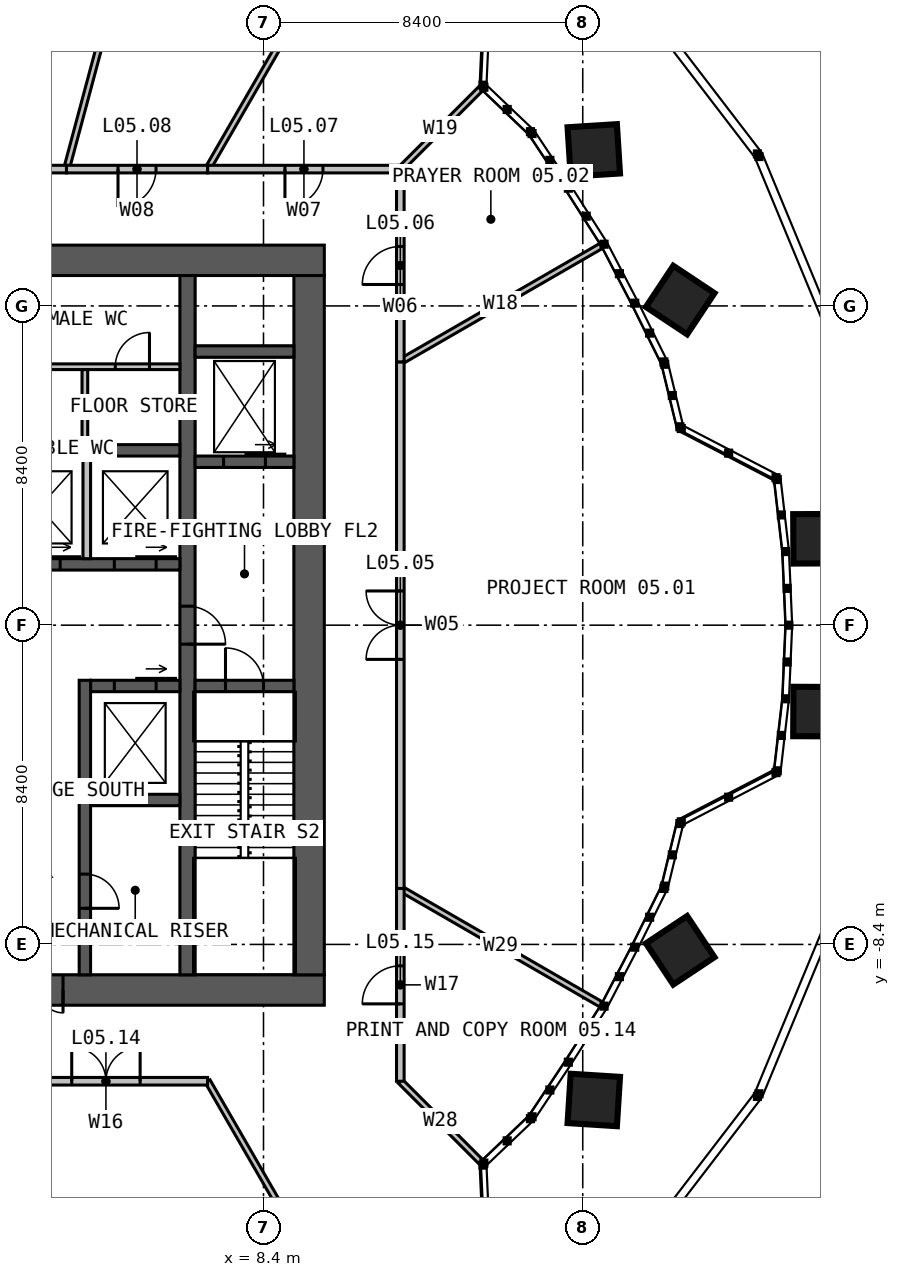
"""IFC4 building model, lengths in metres.
Left out: names, types, materials, properties, quantities, classifications, styles, units other than length and angle.
Written with IfcOpenShell. Run it as: python <this file> out.ifc"""

import sys

from ifc_helpers import new_model, si_unit, direction, frame, frame_2d, origin, place, context, subcontext, project, spatial, rectangle, extrude, element, fill, save


model = new_model("IFC4")
c1 = context("Model", 3, precision=1e-05, world=origin(), true_north=direction((0.0, 1.0)))
c2 = subcontext(c1, "Body", "Model", "MODEL_VIEW")
j1 = project(units=[si_unit("LENGTHUNIT", "METRE"), si_unit("PLANEANGLEUNIT", "RADIAN")], contexts=[c1])
p1 = place(None, origin())
s1 = spatial("IfcSite", under=j1, at=p1, CompositionType="ELEMENT")
p2 = place(p1, origin())
s2 = spatial("IfcBuilding", under=s1, at=p2, CompositionType="ELEMENT")
p3 = place(p2, frame((0.0, 0.0, 25.0)))
s3 = spatial("IfcBuildingStorey", under=s2, at=p3, CompositionType="ELEMENT", Elevation=25.0)
p4 = place(p3, frame((-10.0, 9.6, 0.0), z_axis=(0.0, 0.0, 1.0), x_axis=(1.0, 0.0, 0.0)))
e1 = element("IfcWall", 1, at=p4, inside=s3, PredefinedType="SOLIDWALL", context=c2, shape_type="SweptSolid", body=[
    extrude(rectangle(XDim=20.0, YDim=0.8, at=frame_2d((10.0, 0.0))), origin(), (0.0, 0.0, 1.0), 4.0),
])
p5 = place(p4, frame((9.4, 0.0, 0.0)))
e2 = element("IfcOpeningElement", 2, at=p5, cuts=e1, PredefinedType="OPENING", context=c2, shape_type="SweptSolid", body=[
    extrude(rectangle(XDim=1.2, YDim=2.2, at=frame_2d((0.6, 1.1))), frame((0.0, 0.41, 0.0), z_axis=(0.0, -1.0, 0.0), x_axis=(1.0, 0.0, 0.0)), (0.0, 0.0, 1.0), 0.82),
])
p6 = place(p3, frame((10.0, -9.6, 0.0), z_axis=(0.0, 0.0, 1.0), x_axis=(-1.0, 0.0, 0.0)))
e3 = element("IfcWall", 3, at=p6, inside=s3, PredefinedType="SOLIDWALL", context=c2, shape_type="SweptSolid", body=[
    extrude(rectangle(XDim=20.0, YDim=0.8, at=frame_2d((10.0, 0.0))), origin(), (0.0, 0.0, 1.0), 4.0),
])
p7 = place(p6, frame((6.875, 0.0, 0.0)))
e4 = element("IfcOpeningElement", 4, at=p7, cuts=e3, PredefinedType="OPENING", context=c2, shape_type="SweptSolid", body=[
    extrude(rectangle(XDim=1.2, YDim=2.2, at=frame_2d((0.6, 1.1))), frame((0.0, 0.41, 0.0), z_axis=(0.0, -1.0, 0.0), x_axis=(1.0, 0.0, 0.0)), (0.0, 0.0, 1.0), 0.82),
])
p8 = place(p3, frame((9.6, -9.2, 0.0), z_axis=(0.0, 0.0, 1.0), x_axis=(0.0, 1.0, 0.0)))
e5 = element("IfcWall", 5, at=p8, inside=s3, PredefinedType="SOLIDWALL", context=c2, shape_type="SweptSolid", body=[
    extrude(rectangle(XDim=18.4, YDim=0.8, at=frame_2d((9.2, 0.0))), origin(), (0.0, 0.0, 1.0), 4.0),
])
p9 = place(p3, frame((6.4, 9.2, 0.0), z_axis=(0.0, 0.0, 1.0), x_axis=(0.0, -1.0, 0.0)))
e6 = element("IfcWall", 6, at=p9, inside=s3, PredefinedType="SOLIDWALL", context=c2, shape_type="SweptSolid", body=[
    extrude(rectangle(XDim=18.4, YDim=0.4, at=frame_2d((9.2, 0.0))), origin(), (0.0, 0.0, 1.0), 4.0),
])
p10 = place(p9, frame((8.7, 0.0, 0.0)))
e7 = element("IfcOpeningElement", 7, at=p10, cuts=e6, PredefinedType="OPENING", context=c2, shape_type="SweptSolid", body=[
    extrude(rectangle(XDim=1.0, YDim=2.2, at=frame_2d((0.5, 1.1))), frame((0.0, 0.21, 0.0), z_axis=(0.0, -1.0, 0.0), x_axis=(1.0, 0.0, 0.0)), (0.0, 0.0, 1.0), 0.42),
])
p11 = place(p3, frame((1.35, 1.6, 0.0), z_axis=(0.0, 0.0, 1.0), x_axis=(1.0, 0.0, 0.0)))
e8 = element("IfcWall", 8, at=p11, inside=s3, PredefinedType="SOLIDWALL", context=c2, shape_type="SweptSolid", body=[
    extrude(rectangle(XDim=4.85, YDim=0.3, at=frame_2d((2.425, 0.0))), origin(), (0.0, 0.0, 1.0), 4.0),
])
p12 = place(p11, frame((0.6, 0.0, 0.0)))
e9 = element("IfcOpeningElement", 9, at=p12, cuts=e8, PredefinedType="OPENING", context=c2, shape_type="SweptSolid", body=[
    extrude(rectangle(XDim=1.1, YDim=2.2, at=frame_2d((0.55, 1.1))), frame((0.0, 0.16, 0.0), z_axis=(0.0, -1.0, 0.0), x_axis=(1.0, 0.0, 0.0)), (0.0, 0.0, 1.0), 0.32),
])
p13 = place(p11, frame((3.125, 0.0, 0.0)))
e10 = element("IfcOpeningElement", 10, at=p13, cuts=e8, PredefinedType="OPENING", context=c2, shape_type="SweptSolid", body=[
    extrude(rectangle(XDim=1.1, YDim=2.2, at=frame_2d((0.55, 1.1))), frame((0.0, 0.16, 0.0), z_axis=(0.0, -1.0, 0.0), x_axis=(1.0, 0.0, 0.0)), (0.0, 0.0, 1.0), 0.32),
])
p14 = place(p3, frame((1.35, 4.6, 0.0), z_axis=(0.0, 0.0, 1.0), x_axis=(1.0, 0.0, 0.0)))
e11 = element("IfcWall", 11, at=p14, inside=s3, PredefinedType="SOLIDWALL", context=c2, shape_type="SweptSolid", body=[
    extrude(rectangle(XDim=4.85, YDim=0.3, at=frame_2d((2.425, 0.0))), origin(), (0.0, 0.0, 1.0), 4.0),
])
p15 = place(p3, frame((3.85, -1.6, 0.0), z_axis=(0.0, 0.0, 1.0), x_axis=(1.0, 0.0, 0.0)))
e12 = element("IfcWall", 12, at=p15, inside=s3, PredefinedType="SOLIDWALL", context=c2, shape_type="SweptSolid", body=[
    extrude(rectangle(XDim=2.35, YDim=0.3, at=frame_2d((1.175, 0.0))), origin(), (0.0, 0.0, 1.0), 4.0),
])
p16 = place(p15, frame((0.625, 0.0, 0.0)))
e13 = element("IfcOpeningElement", 13, at=p16, cuts=e12, PredefinedType="OPENING", context=c2, shape_type="SweptSolid", body=[
    extrude(rectangle(XDim=1.1, YDim=2.2, at=frame_2d((0.55, 1.1))), frame((0.0, 0.16, 0.0), z_axis=(0.0, -1.0, 0.0), x_axis=(1.0, 0.0, 0.0)), (0.0, 0.0, 1.0), 0.32),
])
p17 = place(p3, frame((3.85, -4.6, 0.0), z_axis=(0.0, 0.0, 1.0), x_axis=(1.0, 0.0, 0.0)))
e14 = element("IfcWall", 14, at=p17, inside=s3, PredefinedType="SOLIDWALL", context=c2, shape_type="SweptSolid", body=[
    extrude(rectangle(XDim=2.35, YDim=0.3, at=frame_2d((1.175, 0.0))), origin(), (0.0, 0.0, 1.0), 4.0),
])
p18 = place(p3, frame((3.7, -1.45, 0.0), z_axis=(0.0, 0.0, 1.0), x_axis=(0.0, -1.0, 0.0)))
e15 = element("IfcWall", 15, at=p18, inside=s3, PredefinedType="SOLIDWALL", context=c2, shape_type="SweptSolid", body=[
    extrude(rectangle(XDim=7.75, YDim=0.3, at=frame_2d((3.875, 0.0))), origin(), (0.0, 0.0, 1.0), 4.0),
])
p19 = place(p18, frame((5.1, 0.0, 0.0)))
e16 = element("IfcOpeningElement", 16, at=p19, cuts=e15, PredefinedType="OPENING", context=c2, shape_type="SweptSolid", body=[
    extrude(rectangle(XDim=0.9, YDim=2.2, at=frame_2d((0.45, 1.1))), frame((0.0, 0.16, 0.0), z_axis=(0.0, -1.0, 0.0), x_axis=(1.0, 0.0, 0.0)), (0.0, 0.0, 1.0), 0.32),
])
p20 = place(p3, frame((6.6, -1.6, 0.0), z_axis=(0.0, 0.0, 1.0), x_axis=(1.0, 0.0, 0.0)))
e17 = element("IfcWall", 17, at=p20, inside=s3, PredefinedType="SOLIDWALL", context=c2, shape_type="SweptSolid", body=[
    extrude(rectangle(XDim=2.6, YDim=0.3, at=frame_2d((1.3, 0.0))), origin(), (0.0, 0.0, 1.0), 4.0),
])
p21 = place(p20, frame((0.8, 0.0, 0.0)))
e18 = element("IfcOpeningElement", 18, at=p21, cuts=e17, PredefinedType="OPENING", context=c2, shape_type="SweptSolid", body=[
    extrude(rectangle(XDim=1.0, YDim=2.2, at=frame_2d((0.5, 1.1))), frame((0.0, 0.16, 0.0), z_axis=(0.0, -1.0, 0.0), x_axis=(1.0, 0.0, 0.0)), (0.0, 0.0, 1.0), 0.32),
])
p22 = place(p3, frame((6.6, 4.3, 0.0), z_axis=(0.0, 0.0, 1.0), x_axis=(1.0, 0.0, 0.0)))
e19 = element("IfcWall", 19, at=p22, inside=s3, PredefinedType="SOLIDWALL", context=c2, shape_type="SweptSolid", body=[
    extrude(rectangle(XDim=2.6, YDim=0.3, at=frame_2d((1.3, 0.0))), origin(), (0.0, 0.0, 1.0), 4.0),
])
p23 = place(p22, frame((0.75, 0.0, 0.0)))
e20 = element("IfcOpeningElement", 20, at=p23, cuts=e19, PredefinedType="OPENING", context=c2, shape_type="SweptSolid", body=[
    extrude(rectangle(XDim=1.1, YDim=2.2, at=frame_2d((0.55, 1.1))), frame((0.0, 0.16, 0.0), z_axis=(0.0, -1.0, 0.0), x_axis=(1.0, 0.0, 0.0)), (0.0, 0.0, 1.0), 0.32),
])
p24 = place(p3, frame((6.6, 7.2, 0.0), z_axis=(0.0, 0.0, 1.0), x_axis=(1.0, 0.0, 0.0)))
e21 = element("IfcWall", 21, at=p24, inside=s3, PredefinedType="SOLIDWALL", context=c2, shape_type="SweptSolid", body=[
    extrude(rectangle(XDim=2.6, YDim=0.3, at=frame_2d((1.3, 0.0))), origin(), (0.0, 0.0, 1.0), 4.0),
])
p25 = place(p3, frame((3.75, 1.75, 0.0), z_axis=(0.0, 0.0, 1.0), x_axis=(0.0, 1.0, 0.0)))
e22 = element("IfcWall", 22, at=p25, inside=s3, PredefinedType="SOLIDWALL", context=c2, shape_type="SweptSolid", body=[
    extrude(rectangle(XDim=2.7, YDim=0.2, at=frame_2d((1.35, 0.0))), origin(), (0.0, 0.0, 1.0), 3.75),
])
p26 = place(p3, frame((1.35, 6.8, 0.0), z_axis=(0.0, 0.0, 1.0), x_axis=(1.0, 0.0, 0.0)))
e23 = element("IfcWall", 23, at=p26, inside=s3, PredefinedType="PARTITIONING", context=c2, shape_type="SweptSolid", body=[
    extrude(rectangle(XDim=4.85, YDim=0.15, at=frame_2d((2.425, 0.0))), origin(), (0.0, 0.0, 1.0), 3.75),
])
p27 = place(p26, frame((3.15, 0.0, 0.0)))
e24 = element("IfcOpeningElement", 24, at=p27, cuts=e23, PredefinedType="OPENING", context=c2, shape_type="SweptSolid", body=[
    extrude(rectangle(XDim=0.9, YDim=2.2, at=frame_2d((0.45, 1.1))), frame((0.0, 0.085, 0.0), z_axis=(0.0, -1.0, 0.0), x_axis=(1.0, 0.0, 0.0)), (0.0, 0.0, 1.0), 0.17),
])
p28 = place(p3, frame((3.7, 4.75, 0.0), z_axis=(0.0, 0.0, 1.0), x_axis=(0.0, 1.0, 0.0)))
e25 = element("IfcWall", 25, at=p28, inside=s3, PredefinedType="PARTITIONING", context=c2, shape_type="SweptSolid", body=[
    extrude(rectangle(XDim=1.975, YDim=0.15, at=frame_2d((0.988, 0.0))), origin(), (0.0, 0.0, 1.0), 3.75),
])
for number, where, z_axis, x_axis in (
    (26, (12.0, -6.928, 0.0), (0.0, 0.0, 1.0), (0.866, -0.5, 0.0)),
    (27, (12.0, 6.928, 0.0), (0.0, 0.0, 1.0), (0.866, 0.5, 0.0)),
):
    element("IfcWall", number, at=place(p3, frame(where, z_axis=z_axis, x_axis=x_axis)), inside=s3, PredefinedType="PARTITIONING", context=c2, shape_type="SweptSolid", body=[
        extrude(rectangle(XDim=6.099, YDim=0.15, at=frame_2d((3.05, 0.0))), origin(), (0.0, 0.0, 1.0), 2.79),
    ])
p29 = place(p3, frame((12.0, 12.0, 0.0), z_axis=(0.0, 0.0, 1.0), x_axis=(0.707106781187, 0.707106781187, 0.0)))
e28 = element("IfcWall", 28, at=p29, inside=s3, PredefinedType="PARTITIONING", context=c2, shape_type="SweptSolid", body=[
    extrude(rectangle(XDim=2.985, YDim=0.15, at=frame_2d((1.492, 0.0))), origin(), (0.0, 0.0, 1.0), 2.79),
])
p30 = place(p3, frame((6.928, 12.0, 0.0), z_axis=(0.0, 0.0, 1.0), x_axis=(0.499988970207, 0.866031771745, 0.0)))
e29 = element("IfcWall", 29, at=p30, inside=s3, PredefinedType="PARTITIONING", context=c2, shape_type="SweptSolid", body=[
    extrude(rectangle(XDim=8.273, YDim=0.15, at=frame_2d((4.137, 0.0))), origin(), (0.0, 0.0, 1.0), 2.79),
])
p31 = place(p3, frame((3.215, 12.0, 0.0), z_axis=(0.0, 0.0, 1.0), x_axis=(0.258814391452, 0.965927073219, 0.0)))
e30 = element("IfcWall", 30, at=p31, inside=s3, PredefinedType="PARTITIONING", context=c2, shape_type="SweptSolid", body=[
    extrude(rectangle(XDim=7.532, YDim=0.15, at=frame_2d((3.766, 0.0))), origin(), (0.0, 0.0, 1.0), 2.79),
])
p32 = place(p3, frame((6.928, -12.0, 0.0), z_axis=(0.0, 0.0, 1.0), x_axis=(0.499988970207, -0.866031771745, 0.0)))
e31 = element("IfcWall", 31, at=p32, inside=s3, PredefinedType="PARTITIONING", context=c2, shape_type="SweptSolid", body=[
    extrude(rectangle(XDim=8.273, YDim=0.15, at=frame_2d((4.137, 0.0))), origin(), (0.0, 0.0, 1.0), 2.79),
])
p33 = place(p3, frame((12.0, -12.0, 0.0), z_axis=(0.0, 0.0, 1.0), x_axis=(0.707106781187, -0.707106781187, 0.0)))
e32 = element("IfcWall", 32, at=p33, inside=s3, PredefinedType="PARTITIONING", context=c2, shape_type="SweptSolid", body=[
    extrude(rectangle(XDim=2.985, YDim=0.15, at=frame_2d((1.492, 0.0))), origin(), (0.0, 0.0, 1.0), 2.79),
])
p34 = place(p3, frame((12.0, -6.928, 0.0), z_axis=(0.0, 0.0, 1.0), x_axis=(0.0, 1.0, 0.0)))
e33 = element("IfcWall", 33, at=p34, inside=s3, PredefinedType="PARTITIONING", context=c2, shape_type="SweptSolid", body=[
    extrude(rectangle(XDim=13.856, YDim=0.2, at=frame_2d((6.928, 0.0))), origin(), (0.0, 0.0, 1.0), 3.8),
])
p35 = place(p34, frame((6.028, 0.0, 0.0)))
e34 = element("IfcOpeningElement", 34, at=p35, cuts=e33, PredefinedType="OPENING", context=c2, shape_type="SweptSolid", body=[
    extrude(rectangle(XDim=1.8, YDim=2.2, at=frame_2d((0.9, 1.1))), frame((0.0, 0.11, 0.0), z_axis=(0.0, -1.0, 0.0), x_axis=(1.0, 0.0, 0.0)), (0.0, 0.0, 1.0), 0.22),
])
p36 = place(p3, frame((12.0, 6.928, 0.0), z_axis=(0.0, 0.0, 1.0), x_axis=(0.0, 1.0, 0.0)))
e35 = element("IfcWall", 35, at=p36, inside=s3, PredefinedType="PARTITIONING", context=c2, shape_type="SweptSolid", body=[
    extrude(rectangle(XDim=5.072, YDim=0.2, at=frame_2d((2.536, 0.0))), origin(), (0.0, 0.0, 1.0), 3.8),
])
p37 = place(p36, frame((2.036, 0.0, 0.0)))
e36 = element("IfcOpeningElement", 36, at=p37, cuts=e35, PredefinedType="OPENING", context=c2, shape_type="SweptSolid", body=[
    extrude(rectangle(XDim=1.0, YDim=2.2, at=frame_2d((0.5, 1.1))), frame((0.0, 0.11, 0.0), z_axis=(0.0, -1.0, 0.0), x_axis=(1.0, 0.0, 0.0)), (0.0, 0.0, 1.0), 0.22),
])
p38 = place(p3, frame((12.0, 12.0, 0.0), z_axis=(0.0, 0.0, 1.0), x_axis=(-1.0, 0.0, 0.0)))
e37 = element("IfcWall", 37, at=p38, inside=s3, PredefinedType="PARTITIONING", context=c2, shape_type="SweptSolid", body=[
    extrude(rectangle(XDim=5.072, YDim=0.2, at=frame_2d((2.536, 0.0))), origin(), (0.0, 0.0, 1.0), 3.8),
])
p39 = place(p38, frame((2.036, 0.0, 0.0)))
e38 = element("IfcOpeningElement", 38, at=p39, cuts=e37, PredefinedType="OPENING", context=c2, shape_type="SweptSolid", body=[
    extrude(rectangle(XDim=1.0, YDim=2.2, at=frame_2d((0.5, 1.1))), frame((0.0, 0.11, 0.0), z_axis=(0.0, -1.0, 0.0), x_axis=(1.0, 0.0, 0.0)), (0.0, 0.0, 1.0), 0.22),
])
p40 = place(p3, frame((6.928, 12.0, 0.0), z_axis=(0.0, 0.0, 1.0), x_axis=(-1.0, 0.0, 0.0)))
e39 = element("IfcWall", 39, at=p40, inside=s3, PredefinedType="PARTITIONING", context=c2, shape_type="SweptSolid", body=[
    extrude(rectangle(XDim=3.713, YDim=0.2, at=frame_2d((1.856, 0.0))), origin(), (0.0, 0.0, 1.0), 3.8),
])
p41 = place(p40, frame((1.356, 0.0, 0.0)))
e40 = element("IfcOpeningElement", 40, at=p41, cuts=e39, PredefinedType="OPENING", context=c2, shape_type="SweptSolid", body=[
    extrude(rectangle(XDim=1.0, YDim=2.2, at=frame_2d((0.5, 1.1))), frame((0.0, 0.11, 0.0), z_axis=(0.0, -1.0, 0.0), x_axis=(1.0, 0.0, 0.0)), (0.0, 0.0, 1.0), 0.22),
])
p42 = place(p3, frame((3.215, 12.0, 0.0), z_axis=(0.0, 0.0, 1.0), x_axis=(-1.0, 0.0, 0.0)))
e41 = element("IfcWall", 41, at=p42, inside=s3, PredefinedType="PARTITIONING", context=c2, shape_type="SweptSolid", body=[
    extrude(rectangle(XDim=10.144, YDim=0.2, at=frame_2d((5.072, 0.0))), origin(), (0.0, 0.0, 1.0), 3.8),
])
p43 = place(p42, frame((4.172, 0.0, 0.0)))
e42 = element("IfcOpeningElement", 42, at=p43, cuts=e41, PredefinedType="OPENING", context=c2, shape_type="SweptSolid", body=[
    extrude(rectangle(XDim=1.8, YDim=2.2, at=frame_2d((0.9, 1.1))), frame((0.0, 0.11, 0.0), z_axis=(0.0, -1.0, 0.0), x_axis=(1.0, 0.0, 0.0)), (0.0, 0.0, 1.0), 0.22),
])
p44 = place(p3, frame((1.58, -12.0, 0.0), z_axis=(0.0, 0.0, 1.0), x_axis=(1.0, 0.0, 0.0)))
e43 = element("IfcWall", 43, at=p44, inside=s3, PredefinedType="PARTITIONING", context=c2, shape_type="SweptSolid", body=[
    extrude(rectangle(XDim=5.348, YDim=0.2, at=frame_2d((2.674, 0.0))), origin(), (0.0, 0.0, 1.0), 3.8),
])
p45 = place(p44, frame((1.774, 0.0, 0.0)))
e44 = element("IfcOpeningElement", 44, at=p45, cuts=e43, PredefinedType="OPENING", context=c2, shape_type="SweptSolid", body=[
    extrude(rectangle(XDim=1.8, YDim=2.2, at=frame_2d((0.9, 1.1))), frame((0.0, 0.11, 0.0), z_axis=(0.0, -1.0, 0.0), x_axis=(1.0, 0.0, 0.0)), (0.0, 0.0, 1.0), 0.22),
])
p46 = place(p3, frame((12.0, -12.0, 0.0), z_axis=(0.0, 0.0, 1.0), x_axis=(0.0, 1.0, 0.0)))
e45 = element("IfcWall", 45, at=p46, inside=s3, PredefinedType="PARTITIONING", context=c2, shape_type="SweptSolid", body=[
    extrude(rectangle(XDim=5.072, YDim=0.2, at=frame_2d((2.536, 0.0))), origin(), (0.0, 0.0, 1.0), 3.8),
])
p47 = place(p46, frame((2.036, 0.0, 0.0)))
e46 = element("IfcOpeningElement", 46, at=p47, cuts=e45, PredefinedType="OPENING", context=c2, shape_type="SweptSolid", body=[
    extrude(rectangle(XDim=1.0, YDim=2.2, at=frame_2d((0.5, 1.1))), frame((0.0, 0.11, 0.0), z_axis=(0.0, -1.0, 0.0), x_axis=(1.0, 0.0, 0.0)), (0.0, 0.0, 1.0), 0.22),
])
p48 = place(p7, origin())
e47 = element("IfcDoor", 47, at=p48, inside=s3, OperationType="DOUBLE_DOOR_SINGLE_SWING", PredefinedType="DOOR", context=c2, shape_type="SweptSolid", body=[
    extrude(rectangle(XDim=1.2, YDim=2.2, at=frame_2d((0.6, 1.1))), frame((0.0, 0.025, 0.0), z_axis=(0.0, -1.0, 0.0), x_axis=(1.0, 0.0, 0.0)), (0.0, 0.0, 1.0), 0.05),
])
fill(e4, e47)
p49 = place(p10, origin())
e48 = element("IfcDoor", 48, at=p49, inside=s3, OperationType="SINGLE_SWING_RIGHT", PredefinedType="DOOR", context=c2, shape_type="SweptSolid", body=[
    extrude(rectangle(XDim=1.0, YDim=2.2, at=frame_2d((0.5, 1.1))), frame((0.0, 0.025, 0.0), z_axis=(0.0, -1.0, 0.0), x_axis=(1.0, 0.0, 0.0)), (0.0, 0.0, 1.0), 0.05),
])
fill(e7, e48)
p50 = place(p21, origin())
e49 = element("IfcDoor", 49, at=p50, inside=s3, OperationType="SINGLE_SWING_LEFT", PredefinedType="DOOR", context=c2, shape_type="SweptSolid", body=[
    extrude(rectangle(XDim=1.0, YDim=2.2, at=frame_2d((0.5, 1.1))), frame((0.0, 0.025, 0.0), z_axis=(0.0, -1.0, 0.0), x_axis=(1.0, 0.0, 0.0)), (0.0, 0.0, 1.0), 0.05),
])
fill(e18, e49)
p51 = place(p19, origin())
e50 = element("IfcDoor", 50, at=p51, inside=s3, OperationType="SINGLE_SWING_RIGHT", PredefinedType="DOOR", context=c2, shape_type="SweptSolid", body=[
    extrude(rectangle(XDim=0.9, YDim=2.2, at=frame_2d((0.45, 1.1))), frame((0.0, 0.025, 0.0), z_axis=(0.0, -1.0, 0.0), x_axis=(1.0, 0.0, 0.0)), (0.0, 0.0, 1.0), 0.05),
])
fill(e16, e50)
p52 = place(p27, origin())
e51 = element("IfcDoor", 51, at=p52, inside=s3, OperationType="SINGLE_SWING_RIGHT", PredefinedType="DOOR", context=c2, shape_type="SweptSolid", body=[
    extrude(rectangle(XDim=0.9, YDim=2.2, at=frame_2d((0.45, 1.1))), frame((0.0, 0.025, 0.0), z_axis=(0.0, -1.0, 0.0), x_axis=(1.0, 0.0, 0.0)), (0.0, 0.0, 1.0), 0.05),
])
fill(e24, e51)
p53 = place(p12, origin())
e52 = element("IfcDoor", 52, at=p53, inside=s3, OperationType="SLIDING_TO_LEFT", PredefinedType="DOOR", context=c2, shape_type="SweptSolid", body=[
    extrude(rectangle(XDim=1.1, YDim=2.2, at=frame_2d((0.55, 1.1))), frame((0.0, 0.025, 0.0), z_axis=(0.0, -1.0, 0.0), x_axis=(1.0, 0.0, 0.0)), (0.0, 0.0, 1.0), 0.05),
])
fill(e9, e52)
p54 = place(p13, origin())
e53 = element("IfcDoor", 53, at=p54, inside=s3, OperationType="SLIDING_TO_LEFT", PredefinedType="DOOR", context=c2, shape_type="SweptSolid", body=[
    extrude(rectangle(XDim=1.1, YDim=2.2, at=frame_2d((0.55, 1.1))), frame((0.0, 0.025, 0.0), z_axis=(0.0, -1.0, 0.0), x_axis=(1.0, 0.0, 0.0)), (0.0, 0.0, 1.0), 0.05),
])
fill(e10, e53)
p55 = place(p16, origin())
e54 = element("IfcDoor", 54, at=p55, inside=s3, OperationType="SLIDING_TO_LEFT", PredefinedType="DOOR", context=c2, shape_type="SweptSolid", body=[
    extrude(rectangle(XDim=1.1, YDim=2.2, at=frame_2d((0.55, 1.1))), frame((0.0, 0.025, 0.0), z_axis=(0.0, -1.0, 0.0), x_axis=(1.0, 0.0, 0.0)), (0.0, 0.0, 1.0), 0.05),
])
fill(e13, e54)
p56 = place(p23, origin())
e55 = element("IfcDoor", 55, at=p56, inside=s3, OperationType="SLIDING_TO_LEFT", PredefinedType="DOOR", context=c2, shape_type="SweptSolid", body=[
    extrude(rectangle(XDim=1.1, YDim=2.2, at=frame_2d((0.55, 1.1))), frame((0.0, 0.025, 0.0), z_axis=(0.0, -1.0, 0.0), x_axis=(1.0, 0.0, 0.0)), (0.0, 0.0, 1.0), 0.05),
])
fill(e20, e55)
p57 = place(p35, origin())
e56 = element("IfcDoor", 56, at=p57, inside=s3, OperationType="DOUBLE_DOOR_SINGLE_SWING", PredefinedType="DOOR", context=c2, shape_type="SweptSolid", body=[
    extrude(rectangle(XDim=1.8, YDim=2.2, at=frame_2d((0.9, 1.1))), frame((0.0, 0.025, 0.0), z_axis=(0.0, -1.0, 0.0), x_axis=(1.0, 0.0, 0.0)), (0.0, 0.0, 1.0), 0.05),
])
fill(e34, e56)
p58 = place(p37, origin())
e57 = element("IfcDoor", 57, at=p58, inside=s3, OperationType="SINGLE_SWING_LEFT", PredefinedType="DOOR", context=c2, shape_type="SweptSolid", body=[
    extrude(rectangle(XDim=1.0, YDim=2.2, at=frame_2d((0.5, 1.1))), frame((0.0, 0.025, 0.0), z_axis=(0.0, -1.0, 0.0), x_axis=(1.0, 0.0, 0.0)), (0.0, 0.0, 1.0), 0.05),
])
fill(e36, e57)
p59 = place(p39, origin())
e58 = element("IfcDoor", 58, at=p59, inside=s3, OperationType="SINGLE_SWING_RIGHT", PredefinedType="DOOR", context=c2, shape_type="SweptSolid", body=[
    extrude(rectangle(XDim=1.0, YDim=2.2, at=frame_2d((0.5, 1.1))), frame((0.0, 0.025, 0.0), z_axis=(0.0, -1.0, 0.0), x_axis=(1.0, 0.0, 0.0)), (0.0, 0.0, 1.0), 0.05),
])
fill(e38, e58)
p60 = place(p41, origin())
e59 = element("IfcDoor", 59, at=p60, inside=s3, OperationType="SINGLE_SWING_RIGHT", PredefinedType="DOOR", context=c2, shape_type="SweptSolid", body=[
    extrude(rectangle(XDim=1.0, YDim=2.2, at=frame_2d((0.5, 1.1))), frame((0.0, 0.025, 0.0), z_axis=(0.0, -1.0, 0.0), x_axis=(1.0, 0.0, 0.0)), (0.0, 0.0, 1.0), 0.05),
])
fill(e40, e59)
p61 = place(p45, origin())
e60 = element("IfcDoor", 60, at=p61, inside=s3, OperationType="DOUBLE_DOOR_SINGLE_SWING", PredefinedType="DOOR", context=c2, shape_type="SweptSolid", body=[
    extrude(rectangle(XDim=1.8, YDim=2.2, at=frame_2d((0.9, 1.1))), frame((0.0, 0.025, 0.0), z_axis=(0.0, -1.0, 0.0), x_axis=(1.0, 0.0, 0.0)), (0.0, 0.0, 1.0), 0.05),
])
fill(e44, e60)
p62 = place(p47, origin())
e61 = element("IfcDoor", 61, at=p62, inside=s3, OperationType="SINGLE_SWING_LEFT", PredefinedType="DOOR", context=c2, shape_type="SweptSolid", body=[
    extrude(rectangle(XDim=1.0, YDim=2.2, at=frame_2d((0.5, 1.1))), frame((0.0, 0.025, 0.0), z_axis=(0.0, -1.0, 0.0), x_axis=(1.0, 0.0, 0.0)), (0.0, 0.0, 1.0), 0.05),
])
fill(e46, e61)
save(model, sys.argv[1])
